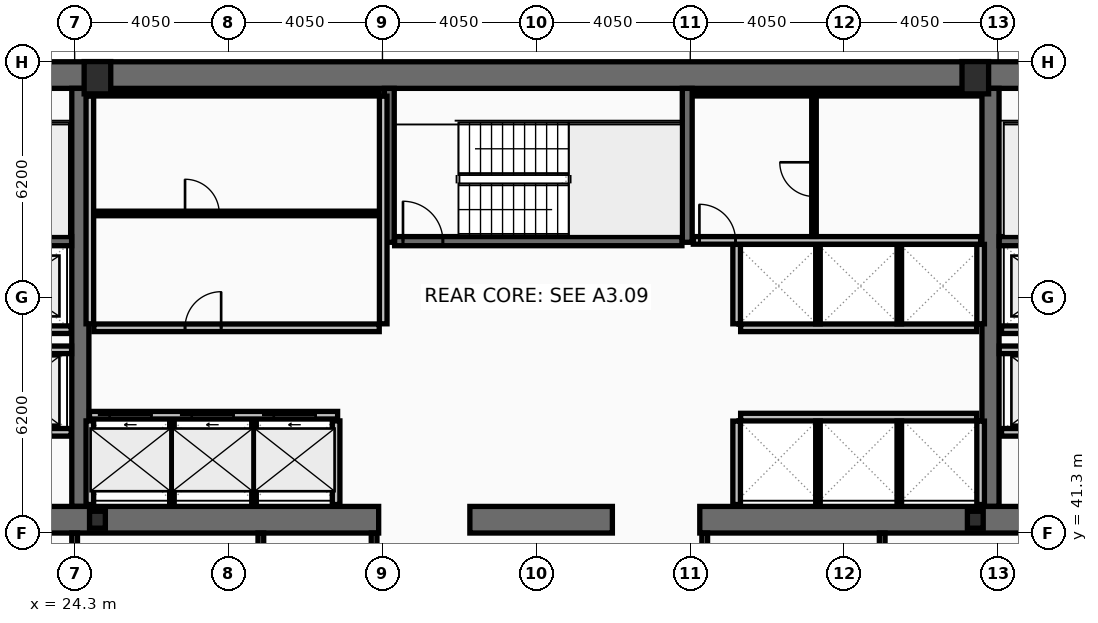
"""IFC4 building model, lengths in metres.
Left out: names, types, materials, properties, quantities, classifications, styles, units other than length and angle.
Written with IfcOpenShell. Run it as: python <this file> out.ifc"""

import sys

from ifc_helpers import new_model, si_unit, direction, frame, frame_2d, origin, origin_2d, place, context, subcontext, project, spatial, rectangle, hollow_rectangle, i_section, extrude, element, fill, save


model = new_model("IFC4")
c1 = context("Model", 3, precision=1e-05, world=origin(), true_north=direction((0.0, 1.0)))
c2 = subcontext(c1, "Body", "Model", "MODEL_VIEW")
j1 = project(units=[si_unit("LENGTHUNIT", "METRE"), si_unit("PLANEANGLEUNIT", "RADIAN")], contexts=[c1])
p1 = place(None, origin())
s1 = spatial("IfcSite", under=j1, at=p1, CompositionType="ELEMENT")
p2 = place(p1, origin())
s2 = spatial("IfcBuilding", under=s1, at=p2, CompositionType="ELEMENT")
p3 = place(p2, frame((0.0, 0.0, 154.2)))
s3 = spatial("IfcBuildingStorey", under=s2, at=p3, CompositionType="ELEMENT", Elevation=154.2)
p4 = place(p3, frame((16.2, 53.35, 0.0), z_axis=(0.0, 0.0, 1.0), x_axis=(1.0, 0.0, 0.0)))
e1 = element("IfcWall", 1, at=p4, inside=s3, PredefinedType="SHEAR", context=c2, shape_type="SweptSolid", body=[
    extrude(rectangle(XDim=40.5, YDim=0.7, at=frame_2d((20.25, 0.0))), origin(), (0.0, 0.0, 1.0), 3.44),
])
for number, where, z_axis, x_axis in (
    (2, (24.45, 42.0, 0.0), (0.0, 0.0, 1.0), (0.0, 1.0, 0.0)),
    (3, (48.4, 42.0, 0.0), (0.0, 0.0, 1.0), (0.0, 1.0, 0.0)),
):
    element("IfcWall", number, at=place(p3, frame(where, z_axis=z_axis, x_axis=x_axis)), inside=s3, PredefinedType="SHEAR", context=c2, shape_type="SweptSolid", body=[
        extrude(rectangle(XDim=11.0, YDim=0.45, at=frame_2d((5.5, 0.0))), origin(), (0.0, 0.0, 1.0), 3.44),
    ])
p5 = place(p3, frame((32.3, 41.65, 0.0), z_axis=(0.0, 0.0, 1.0), x_axis=(-1.0, 0.0, 0.0)))
e4 = element("IfcWall", 4, at=p5, inside=s3, PredefinedType="SHEAR", context=c2, shape_type="SweptSolid", body=[
    extrude(rectangle(XDim=11.45, YDim=0.7, at=frame_2d((5.725, 0.0))), origin(), (0.0, 0.0, 1.0), 3.44),
])
p6 = place(p3, frame((38.45, 41.65, 0.0), z_axis=(0.0, 0.0, 1.0), x_axis=(-1.0, 0.0, 0.0)))
e5 = element("IfcWall", 5, at=p6, inside=s3, PredefinedType="SHEAR", context=c2, shape_type="SweptSolid", body=[
    extrude(rectangle(XDim=3.75, YDim=0.7, at=frame_2d((1.875, 0.0))), origin(), (0.0, 0.0, 1.0), 3.44),
])
p7 = place(p3, frame((52.05, 41.65, 0.0), z_axis=(0.0, 0.0, 1.0), x_axis=(-1.0, 0.0, 0.0)))
e6 = element("IfcWall", 6, at=p7, inside=s3, PredefinedType="SHEAR", context=c2, shape_type="SweptSolid", body=[
    extrude(rectangle(XDim=11.3, YDim=0.7, at=frame_2d((5.65, 0.0))), origin(), (0.0, 0.0, 1.0), 3.44),
])
for number, where, z_axis, x_axis in (
    (7, (32.58, 48.95, 0.0), (0.0, 0.0, 1.0), (0.0, 1.0, 0.0)),
    (8, (40.42, 48.95, 0.0), (0.0, 0.0, 1.0), (0.0, 1.0, 0.0)),
):
    element("IfcWall", number, at=place(p3, frame(where, z_axis=z_axis, x_axis=x_axis)), inside=s3, PredefinedType="SHEAR", context=c2, shape_type="SweptSolid", body=[
        extrude(rectangle(XDim=4.05, YDim=0.26, at=frame_2d((2.025, 0.0))), origin(), (0.0, 0.0, 1.0), 3.44),
    ])
p8 = place(p3, frame((16.9, 48.98, 0.0), z_axis=(0.0, 0.0, 1.0), x_axis=(1.0, 0.0, 0.0)))
e9 = element("IfcWall", 9, at=p8, inside=s3, PredefinedType="SHEAR", context=c2, shape_type="SweptSolid", body=[
    extrude(rectangle(XDim=7.32, YDim=0.24, at=frame_2d((3.66, 0.0))), origin(), (0.0, 0.0, 1.0), 3.44),
])
p9 = place(p8, frame((0.22, 0.0, 0.0)))
e10 = element("IfcOpeningElement", 10, at=p9, cuts=e9, PredefinedType="OPENING", context=c2, shape_type="SweptSolid", body=[
    extrude(rectangle(XDim=1.05, YDim=2.15, at=frame_2d((0.525, 1.075))), frame((0.0, 0.13, 0.0), z_axis=(0.0, -1.0, 0.0), x_axis=(1.0, 0.0, 0.0)), (0.0, 0.0, 1.0), 0.26),
])
p10 = place(p3, frame((48.63, 48.98, 0.0), z_axis=(0.0, 0.0, 1.0), x_axis=(1.0, 0.0, 0.0)))
e11 = element("IfcWall", 11, at=p10, inside=s3, PredefinedType="SHEAR", context=c2, shape_type="SweptSolid", body=[
    extrude(rectangle(XDim=7.37, YDim=0.24, at=frame_2d((3.685, 0.0))), origin(), (0.0, 0.0, 1.0), 3.44),
])
p11 = place(p10, frame((6.1, 0.0, 0.0)))
e12 = element("IfcOpeningElement", 12, at=p11, cuts=e11, PredefinedType="OPENING", context=c2, shape_type="SweptSolid", body=[
    extrude(rectangle(XDim=1.05, YDim=2.15, at=frame_2d((0.525, 1.075))), frame((0.0, 0.13, 0.0), z_axis=(0.0, -1.0, 0.0), x_axis=(1.0, 0.0, 0.0)), (0.0, 0.0, 1.0), 0.26),
])
p12 = place(p3, frame((32.72, 48.98, 0.0), z_axis=(0.0, 0.0, 1.0), x_axis=(1.0, 0.0, 0.0)))
e13 = element("IfcWall", 13, at=p12, inside=s3, PredefinedType="SHEAR", context=c2, shape_type="SweptSolid", body=[
    extrude(rectangle(XDim=7.56, YDim=0.24, at=frame_2d((3.78, 0.0))), origin(), (0.0, 0.0, 1.0), 3.44),
])
p13 = place(p12, frame((0.22, 0.0, 0.0)))
e14 = element("IfcOpeningElement", 14, at=p13, cuts=e13, PredefinedType="OPENING", context=c2, shape_type="SweptSolid", body=[
    extrude(rectangle(XDim=1.05, YDim=2.15, at=frame_2d((0.525, 1.075))), frame((0.0, 0.13, 0.0), z_axis=(0.0, -1.0, 0.0), x_axis=(1.0, 0.0, 0.0)), (0.0, 0.0, 1.0), 0.26),
])
for number, where, z_axis, x_axis in (
    (15, (24.9, 53.28, 0.0), (0.0, 0.0, 1.0), (1.0, 0.0, 0.0)),
    (16, (48.0, 53.28, 0.0), (0.0, 0.0, 1.0), (1.0, 0.0, 0.0)),
):
    element("IfcColumn", number, at=place(p3, frame(where, z_axis=z_axis, x_axis=x_axis)), inside=s3, PredefinedType="COLUMN", context=c2, shape_type="SweptSolid", body=[
        extrude(hollow_rectangle(XDim=0.7, YDim=0.85, WallThickness=0.05, at=origin_2d()), origin(), (0.0, 0.0, 1.0), 3.6),
    ])
for number, where, z_axis, x_axis in (
    (17, (24.9, 41.65, 0.0), (0.0, 0.0, 1.0), (1.0, 0.0, 0.0)),
    (18, (48.0, 41.65, 0.0), (0.0, 0.0, 1.0), (1.0, 0.0, 0.0)),
):
    element("IfcColumn", number, at=place(p3, frame(where, z_axis=z_axis, x_axis=x_axis)), inside=s3, PredefinedType="COLUMN", context=c2, shape_type="SweptSolid", body=[
        extrude(i_section(OverallWidth=0.416, OverallDepth=0.446, WebThickness=0.039, FlangeThickness=0.063, at=origin_2d()), origin(), (0.0, 0.0, 1.0), 3.6),
    ])
p14 = place(p3, frame((24.69, 44.4, 0.0), z_axis=(0.0, 0.0, 1.0), x_axis=(1.0, 0.0, 0.0)))
e19 = element("IfcWall", 19, at=p14, inside=s3, PredefinedType="PARTITIONING", context=c2, shape_type="SweptSolid", body=[
    extrude(rectangle(XDim=6.53, YDim=0.2, at=frame_2d((3.265, 0.0))), origin(), (0.0, 0.0, 1.0), 3.44),
])
p15 = place(p14, frame((0.53, 0.0, 0.0)))
e20 = element("IfcOpeningElement", 20, at=p15, cuts=e19, PredefinedType="OPENING", context=c2, shape_type="SweptSolid", body=[
    extrude(rectangle(XDim=1.1, YDim=2.18, at=frame_2d((0.55, 1.09))), frame((0.0, 0.11, 0.0), z_axis=(0.0, -1.0, 0.0), x_axis=(1.0, 0.0, 0.0)), (0.0, 0.0, 1.0), 0.22),
])
p16 = place(p14, frame((2.69, 0.0, 0.0)))
e21 = element("IfcOpeningElement", 21, at=p16, cuts=e19, PredefinedType="OPENING", context=c2, shape_type="SweptSolid", body=[
    extrude(rectangle(XDim=1.1, YDim=2.18, at=frame_2d((0.55, 1.09))), frame((0.0, 0.11, 0.0), z_axis=(0.0, -1.0, 0.0), x_axis=(1.0, 0.0, 0.0)), (0.0, 0.0, 1.0), 0.22),
])
p17 = place(p14, frame((4.85, 0.0, 0.0)))
e22 = element("IfcOpeningElement", 22, at=p17, cuts=e19, PredefinedType="OPENING", context=c2, shape_type="SweptSolid", body=[
    extrude(rectangle(XDim=1.1, YDim=2.18, at=frame_2d((0.55, 1.09))), frame((0.0, 0.11, 0.0), z_axis=(0.0, -1.0, 0.0), x_axis=(1.0, 0.0, 0.0)), (0.0, 0.0, 1.0), 0.22),
])
p18 = place(p3, frame((51.61, 43.95, 0.0), z_axis=(0.0, 0.0, 1.0), x_axis=(-1.0, 0.0, 0.0)))
e23 = element("IfcWall", 23, at=p18, inside=s3, PredefinedType="PARTITIONING", context=c2, shape_type="SweptSolid", body=[
    extrude(rectangle(XDim=2.92, YDim=0.2, at=frame_2d((1.46, 0.0))), origin(), (0.0, 0.0, 1.0), 3.44),
])
p19 = place(p18, frame((0.81, 0.0, 0.0)))
e24 = element("IfcOpeningElement", 24, at=p19, cuts=e23, PredefinedType="OPENING", context=c2, shape_type="SweptSolid", body=[
    extrude(rectangle(XDim=1.3, YDim=2.18, at=frame_2d((0.65, 1.09))), frame((0.0, 0.11, 0.0), z_axis=(0.0, -1.0, 0.0), x_axis=(1.0, 0.0, 0.0)), (0.0, 0.0, 1.0), 0.22),
])
p20 = place(p3, frame((24.21, 43.95, 0.0), z_axis=(0.0, 0.0, 1.0), x_axis=(-1.0, 0.0, 0.0)))
e25 = element("IfcWall", 25, at=p20, inside=s3, PredefinedType="PARTITIONING", context=c2, shape_type="SweptSolid", body=[
    extrude(rectangle(XDim=2.97, YDim=0.2, at=frame_2d((1.485, 0.0))), origin(), (0.0, 0.0, 1.0), 3.44),
])
p21 = place(p20, frame((0.86, 0.0, 0.0)))
e26 = element("IfcOpeningElement", 26, at=p21, cuts=e25, PredefinedType="OPENING", context=c2, shape_type="SweptSolid", body=[
    extrude(rectangle(XDim=1.3, YDim=2.18, at=frame_2d((0.65, 1.09))), frame((0.0, 0.11, 0.0), z_axis=(0.0, -1.0, 0.0), x_axis=(1.0, 0.0, 0.0)), (0.0, 0.0, 1.0), 0.22),
])
p22 = place(p3, frame((51.61, 46.65, 0.0), z_axis=(0.0, 0.0, 1.0), x_axis=(-1.0, 0.0, 0.0)))
e27 = element("IfcWall", 27, at=p22, inside=s3, PredefinedType="PARTITIONING", context=c2, shape_type="SweptSolid", body=[
    extrude(rectangle(XDim=2.92, YDim=0.2, at=frame_2d((1.46, 0.0))), origin(), (0.0, 0.0, 1.0), 3.44),
])
p23 = place(p22, frame((0.86, 0.0, 0.0)))
e28 = element("IfcOpeningElement", 28, at=p23, cuts=e27, PredefinedType="OPENING", context=c2, shape_type="SweptSolid", body=[
    extrude(rectangle(XDim=1.2, YDim=2.18, at=frame_2d((0.6, 1.09))), frame((0.0, 0.11, 0.0), z_axis=(0.0, -1.0, 0.0), x_axis=(1.0, 0.0, 0.0)), (0.0, 0.0, 1.0), 0.22),
])
p24 = place(p3, frame((24.21, 46.65, 0.0), z_axis=(0.0, 0.0, 1.0), x_axis=(-1.0, 0.0, 0.0)))
e29 = element("IfcWall", 29, at=p24, inside=s3, PredefinedType="PARTITIONING", context=c2, shape_type="SweptSolid", body=[
    extrude(rectangle(XDim=2.97, YDim=0.2, at=frame_2d((1.485, 0.0))), origin(), (0.0, 0.0, 1.0), 3.44),
])
p25 = place(p24, frame((0.91, 0.0, 0.0)))
e30 = element("IfcOpeningElement", 30, at=p25, cuts=e29, PredefinedType="OPENING", context=c2, shape_type="SweptSolid", body=[
    extrude(rectangle(XDim=1.2, YDim=2.18, at=frame_2d((0.6, 1.09))), frame((0.0, 0.11, 0.0), z_axis=(0.0, -1.0, 0.0), x_axis=(1.0, 0.0, 0.0)), (0.0, 0.0, 1.0), 0.22),
])
p26 = place(p3, frame((21.2, 46.12, 0.0), z_axis=(0.0, 0.0, 1.0), x_axis=(1.0, 0.0, 0.0)))
e31 = element("IfcWall", 31, at=p26, inside=s3, PredefinedType="PARTITIONING", context=c2, shape_type="SweptSolid", body=[
    extrude(rectangle(XDim=3.02, YDim=0.2, at=frame_2d((1.51, 0.0))), origin(), (0.0, 0.0, 1.0), 3.44),
])
p27 = place(p3, frame((48.63, 46.12, 0.0), z_axis=(0.0, 0.0, 1.0), x_axis=(1.0, 0.0, 0.0)))
e32 = element("IfcWall", 32, at=p27, inside=s3, PredefinedType="PARTITIONING", context=c2, shape_type="SweptSolid", body=[
    extrude(rectangle(XDim=3.07, YDim=0.2, at=frame_2d((1.535, 0.0))), origin(), (0.0, 0.0, 1.0), 3.44),
])
for number, where, z_axis, x_axis in (
    (33, (24.7, 46.805, 0.0), (0.0, 0.0, 1.0), (0.0, 1.0, 0.0)),
    (34, (32.42, 46.805, 0.0), (0.0, 0.0, 1.0), (0.0, 1.0, 0.0)),
):
    element("IfcWall", number, at=place(p3, frame(where, z_axis=z_axis, x_axis=x_axis)), inside=s3, PredefinedType="PARTITIONING", context=c2, shape_type="SweptSolid", body=[
        extrude(rectangle(XDim=5.99, YDim=0.2, at=frame_2d((2.995, 0.0))), origin(), (0.0, 0.0, 1.0), 3.44),
    ])
p28 = place(p3, frame((24.805, 52.86, 0.0), z_axis=(0.0, 0.0, 1.0), x_axis=(1.0, 0.0, 0.0)))
e35 = element("IfcWall", 35, at=p28, inside=s3, PredefinedType="PARTITIONING", context=c2, shape_type="SweptSolid", body=[
    extrude(rectangle(XDim=7.51, YDim=0.12, at=frame_2d((3.755, 0.0))), origin(), (0.0, 0.0, 1.0), 3.44),
])
p29 = place(p3, frame((24.805, 49.709, 0.0), z_axis=(0.0, 0.0, 1.0), x_axis=(1.0, 0.0, 0.0)))
e36 = element("IfcWall", 36, at=p29, inside=s3, PredefinedType="PARTITIONING", context=c2, shape_type="SweptSolid", body=[
    extrude(rectangle(XDim=7.51, YDim=0.12, at=frame_2d((3.755, 0.0))), origin(), (0.0, 0.0, 1.0), 3.44),
])
p30 = place(p29, frame((2.4, 0.0, 0.0)))
e37 = element("IfcOpeningElement", 37, at=p30, cuts=e36, PredefinedType="OPENING", context=c2, shape_type="SweptSolid", body=[
    extrude(rectangle(XDim=0.9, YDim=2.05, at=frame_2d((0.45, 1.025))), frame((0.0, 0.07, 0.0), z_axis=(0.0, -1.0, 0.0), x_axis=(1.0, 0.0, 0.0)), (0.0, 0.0, 1.0), 0.14),
])
p31 = place(p3, frame((24.805, 46.7, 0.0), z_axis=(0.0, 0.0, 1.0), x_axis=(1.0, 0.0, 0.0)))
e38 = element("IfcWall", 38, at=p31, inside=s3, PredefinedType="PARTITIONING", context=c2, shape_type="SweptSolid", body=[
    extrude(rectangle(XDim=7.51, YDim=0.2, at=frame_2d((3.755, 0.0))), origin(), (0.0, 0.0, 1.0), 3.44),
])
p32 = place(p31, frame((2.4, 0.0, 0.0)))
e39 = element("IfcOpeningElement", 39, at=p32, cuts=e38, PredefinedType="OPENING", context=c2, shape_type="SweptSolid", body=[
    extrude(rectangle(XDim=0.95, YDim=2.1, at=frame_2d((0.475, 1.05))), frame((0.0, 0.11, 0.0), z_axis=(0.0, -1.0, 0.0), x_axis=(1.0, 0.0, 0.0)), (0.0, 0.0, 1.0), 0.22),
])
for number, where, z_axis, x_axis in (
    (40, (24.7, 42.05, 0.0), (0.0, 0.0, 1.0), (0.0, 1.0, 0.0)),
    (41, (31.18, 42.05, 0.0), (0.0, 0.0, 1.0), (0.0, 1.0, 0.0)),
):
    element("IfcWall", number, at=place(p3, frame(where, z_axis=z_axis, x_axis=x_axis)), inside=s3, PredefinedType="PARTITIONING", context=c2, shape_type="SweptSolid", body=[
        extrude(rectangle(XDim=2.2, YDim=0.2, at=frame_2d((1.1, 0.0))), origin(), (0.0, 0.0, 1.0), 3.44),
    ])
for number, where, z_axis, x_axis in (
    (42, (26.86, 42.05, 0.0), (0.0, 0.0, 1.0), (0.0, 1.0, 0.0)),
    (43, (29.02, 42.05, 0.0), (0.0, 0.0, 1.0), (0.0, 1.0, 0.0)),
):
    element("IfcWall", number, at=place(p3, frame(where, z_axis=z_axis, x_axis=x_axis)), inside=s3, PredefinedType="PARTITIONING", context=c2, shape_type="SweptSolid", body=[
        extrude(rectangle(XDim=2.2, YDim=0.12, at=frame_2d((1.1, 0.0))), origin(), (0.0, 0.0, 1.0), 3.44),
    ])
p33 = place(p3, frame((41.825, 46.7, 0.0), z_axis=(0.0, 0.0, 1.0), x_axis=(1.0, 0.0, 0.0)))
e44 = element("IfcWall", 44, at=p33, inside=s3, PredefinedType="PARTITIONING", context=c2, shape_type="SweptSolid", body=[
    extrude(rectangle(XDim=6.21, YDim=0.2, at=frame_2d((3.105, 0.0))), origin(), (0.0, 0.0, 1.0), 3.44),
])
for number, where, z_axis, x_axis in (
    (45, (41.72, 46.805, 0.0), (0.0, 0.0, 1.0), (0.0, 1.0, 0.0)),
    (46, (48.14, 46.805, 0.0), (0.0, 0.0, 1.0), (0.0, 1.0, 0.0)),
):
    element("IfcWall", number, at=place(p3, frame(where, z_axis=z_axis, x_axis=x_axis)), inside=s3, PredefinedType="PARTITIONING", context=c2, shape_type="SweptSolid", body=[
        extrude(rectangle(XDim=2.09, YDim=0.2, at=frame_2d((1.045, 0.0))), origin(), (0.0, 0.0, 1.0), 3.44),
    ])
for number, where, z_axis, x_axis in (
    (47, (43.86, 46.805, 0.0), (0.0, 0.0, 1.0), (0.0, 1.0, 0.0)),
    (48, (46.0, 46.805, 0.0), (0.0, 0.0, 1.0), (0.0, 1.0, 0.0)),
):
    element("IfcWall", number, at=place(p3, frame(where, z_axis=z_axis, x_axis=x_axis)), inside=s3, PredefinedType="PARTITIONING", context=c2, shape_type="SweptSolid", body=[
        extrude(rectangle(XDim=2.09, YDim=0.12, at=frame_2d((1.045, 0.0))), origin(), (0.0, 0.0, 1.0), 3.44),
    ])
p34 = place(p3, frame((41.825, 44.35, 0.0), z_axis=(0.0, 0.0, 1.0), x_axis=(1.0, 0.0, 0.0)))
e49 = element("IfcWall", 49, at=p34, inside=s3, PredefinedType="PARTITIONING", context=c2, shape_type="SweptSolid", body=[
    extrude(rectangle(XDim=6.21, YDim=0.2, at=frame_2d((3.105, 0.0))), origin(), (0.0, 0.0, 1.0), 3.44),
])
for number, where, z_axis, x_axis in (
    (50, (41.72, 42.05, 0.0), (0.0, 0.0, 1.0), (0.0, 1.0, 0.0)),
    (51, (48.14, 42.05, 0.0), (0.0, 0.0, 1.0), (0.0, 1.0, 0.0)),
):
    element("IfcWall", number, at=place(p3, frame(where, z_axis=z_axis, x_axis=x_axis)), inside=s3, PredefinedType="PARTITIONING", context=c2, shape_type="SweptSolid", body=[
        extrude(rectangle(XDim=2.195, YDim=0.2, at=frame_2d((1.098, 0.0))), origin(), (0.0, 0.0, 1.0), 3.44),
    ])
for number, where, z_axis, x_axis in (
    (52, (43.86, 42.05, 0.0), (0.0, 0.0, 1.0), (0.0, 1.0, 0.0)),
    (53, (46.0, 42.05, 0.0), (0.0, 0.0, 1.0), (0.0, 1.0, 0.0)),
):
    element("IfcWall", number, at=place(p3, frame(where, z_axis=z_axis, x_axis=x_axis)), inside=s3, PredefinedType="PARTITIONING", context=c2, shape_type="SweptSolid", body=[
        extrude(rectangle(XDim=2.195, YDim=0.12, at=frame_2d((1.098, 0.0))), origin(), (0.0, 0.0, 1.0), 3.44),
    ])
p35 = place(p3, frame((40.58, 52.86, 0.0), z_axis=(0.0, 0.0, 1.0), x_axis=(1.0, 0.0, 0.0)))
e54 = element("IfcWall", 54, at=p35, inside=s3, PredefinedType="PARTITIONING", context=c2, shape_type="SweptSolid", body=[
    extrude(rectangle(XDim=7.56, YDim=0.12, at=frame_2d((3.78, 0.0))), origin(), (0.0, 0.0, 1.0), 3.44),
])
p36 = place(p3, frame((40.58, 49.0, 0.0), z_axis=(0.0, 0.0, 1.0), x_axis=(1.0, 0.0, 0.0)))
e55 = element("IfcWall", 55, at=p36, inside=s3, PredefinedType="PARTITIONING", context=c2, shape_type="SweptSolid", body=[
    extrude(rectangle(XDim=7.56, YDim=0.2, at=frame_2d((3.78, 0.0))), origin(), (0.0, 0.0, 1.0), 3.44),
])
p37 = place(p36, frame((0.16, 0.0, 0.0)))
e56 = element("IfcOpeningElement", 56, at=p37, cuts=e55, PredefinedType="OPENING", context=c2, shape_type="SweptSolid", body=[
    extrude(rectangle(XDim=0.95, YDim=2.1, at=frame_2d((0.475, 1.05))), frame((0.0, 0.11, 0.0), z_axis=(0.0, -1.0, 0.0), x_axis=(1.0, 0.0, 0.0)), (0.0, 0.0, 1.0), 0.22),
])
p38 = place(p3, frame((43.755, 49.105, 0.0), z_axis=(0.0, 0.0, 1.0), x_axis=(0.0, 1.0, 0.0)))
e57 = element("IfcWall", 57, at=p38, inside=s3, PredefinedType="PARTITIONING", context=c2, shape_type="SweptSolid", body=[
    extrude(rectangle(XDim=3.69, YDim=0.12, at=frame_2d((1.845, 0.0))), origin(), (0.0, 0.0, 1.0), 3.44),
])
p39 = place(p38, frame((1.05, 0.0, 0.0)))
e58 = element("IfcOpeningElement", 58, at=p39, cuts=e57, PredefinedType="OPENING", context=c2, shape_type="SweptSolid", body=[
    extrude(rectangle(XDim=0.9, YDim=2.05, at=frame_2d((0.45, 1.025))), frame((0.0, 0.07, 0.0), z_axis=(0.0, -1.0, 0.0), x_axis=(1.0, 0.0, 0.0)), (0.0, 0.0, 1.0), 0.14),
])
for number, where, z_axis, x_axis in (
    (59, (24.3, 38.28, 0.0), (0.0, 0.0, 1.0), (0.0, 1.0, 0.0)),
    (60, (29.2, 38.28, 0.0), (0.0, 0.0, 1.0), (0.0, 1.0, 0.0)),
    (61, (32.18, 38.28, 0.0), (0.0, 0.0, 1.0), (0.0, 1.0, 0.0)),
    (62, (40.88, 38.28, 0.0), (0.0, 0.0, 1.0), (0.0, 1.0, 0.0)),
    (63, (45.55, 38.28, 0.0), (0.0, 0.0, 1.0), (0.0, 1.0, 0.0)),
):
    element("IfcWall", number, at=place(p3, frame(where, z_axis=z_axis, x_axis=x_axis)), inside=s3, PredefinedType="PARTITIONING", context=c2, shape_type="SweptSolid", body=[
        extrude(rectangle(XDim=3.02, YDim=0.15, at=frame_2d((1.51, 0.0))), origin(), (0.0, 0.0, 1.0), 3.44),
    ])
p40 = place(p13, origin())
e64 = element("IfcDoor", 64, at=p40, inside=s3, OperationType="SINGLE_SWING_LEFT", PredefinedType="DOOR", context=c2, shape_type="SweptSolid", body=[
    extrude(rectangle(XDim=1.05, YDim=2.15, at=frame_2d((0.525, 1.075))), frame((0.0, 0.025, 0.0), z_axis=(0.0, -1.0, 0.0), x_axis=(1.0, 0.0, 0.0)), (0.0, 0.0, 1.0), 0.05),
])
fill(e14, e64)
p41 = place(p15, origin())
e65 = element("IfcDoor", 65, at=p41, inside=s3, OperationType="SLIDING_TO_LEFT", PredefinedType="DOOR", context=c2, shape_type="SweptSolid", body=[
    extrude(rectangle(XDim=1.1, YDim=2.18, at=frame_2d((0.55, 1.09))), frame((0.0, 0.025, 0.0), z_axis=(0.0, -1.0, 0.0), x_axis=(1.0, 0.0, 0.0)), (0.0, 0.0, 1.0), 0.05),
])
fill(e20, e65)
p42 = place(p16, origin())
e66 = element("IfcDoor", 66, at=p42, inside=s3, OperationType="SLIDING_TO_LEFT", PredefinedType="DOOR", context=c2, shape_type="SweptSolid", body=[
    extrude(rectangle(XDim=1.1, YDim=2.18, at=frame_2d((0.55, 1.09))), frame((0.0, 0.025, 0.0), z_axis=(0.0, -1.0, 0.0), x_axis=(1.0, 0.0, 0.0)), (0.0, 0.0, 1.0), 0.05),
])
fill(e21, e66)
p43 = place(p17, origin())
e67 = element("IfcDoor", 67, at=p43, inside=s3, OperationType="SLIDING_TO_LEFT", PredefinedType="DOOR", context=c2, shape_type="SweptSolid", body=[
    extrude(rectangle(XDim=1.1, YDim=2.18, at=frame_2d((0.55, 1.09))), frame((0.0, 0.025, 0.0), z_axis=(0.0, -1.0, 0.0), x_axis=(1.0, 0.0, 0.0)), (0.0, 0.0, 1.0), 0.05),
])
fill(e22, e67)
p44 = place(p30, origin())
e68 = element("IfcDoor", 68, at=p44, inside=s3, OperationType="SINGLE_SWING_LEFT", PredefinedType="DOOR", context=c2, shape_type="SweptSolid", body=[
    extrude(rectangle(XDim=0.9, YDim=2.05, at=frame_2d((0.45, 1.025))), frame((0.0, 0.025, 0.0), z_axis=(0.0, -1.0, 0.0), x_axis=(1.0, 0.0, 0.0)), (0.0, 0.0, 1.0), 0.05),
])
fill(e37, e68)
p45 = place(p32, origin())
e69 = element("IfcDoor", 69, at=p45, inside=s3, OperationType="SINGLE_SWING_RIGHT", PredefinedType="DOOR", context=c2, shape_type="SweptSolid", body=[
    extrude(rectangle(XDim=0.95, YDim=2.1, at=frame_2d((0.475, 1.05))), frame((0.0, 0.025, 0.0), z_axis=(0.0, -1.0, 0.0), x_axis=(1.0, 0.0, 0.0)), (0.0, 0.0, 1.0), 0.05),
])
fill(e39, e69)
p46 = place(p37, origin())
e70 = element("IfcDoor", 70, at=p46, inside=s3, OperationType="SINGLE_SWING_LEFT", PredefinedType="DOOR", context=c2, shape_type="SweptSolid", body=[
    extrude(rectangle(XDim=0.95, YDim=2.1, at=frame_2d((0.475, 1.05))), frame((0.0, 0.025, 0.0), z_axis=(0.0, -1.0, 0.0), x_axis=(1.0, 0.0, 0.0)), (0.0, 0.0, 1.0), 0.05),
])
fill(e56, e70)
p47 = place(p39, origin())
e71 = element("IfcDoor", 71, at=p47, inside=s3, OperationType="SINGLE_SWING_RIGHT", PredefinedType="DOOR", context=c2, shape_type="SweptSolid", body=[
    extrude(rectangle(XDim=0.9, YDim=2.05, at=frame_2d((0.45, 1.025))), frame((0.0, 0.025, 0.0), z_axis=(0.0, -1.0, 0.0), x_axis=(1.0, 0.0, 0.0)), (0.0, 0.0, 1.0), 0.05),
])
fill(e58, e71)
save(model, sys.argv[1])
